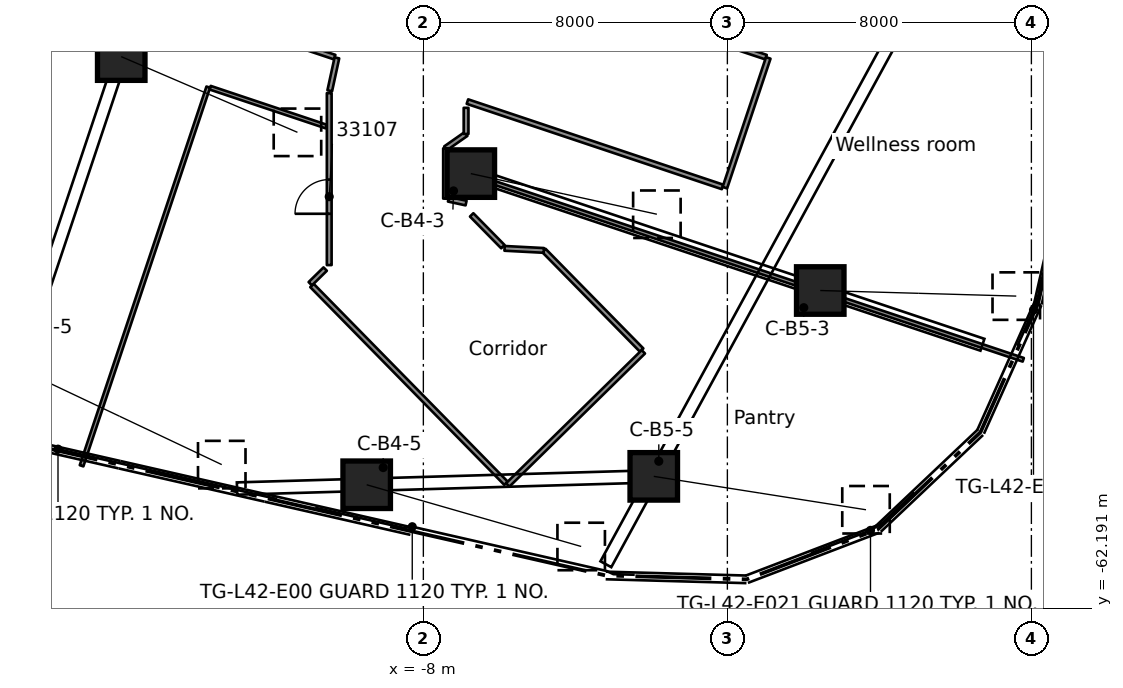
"""IFC4 building model, lengths in metres.
Left out: names, types, materials, properties, quantities, classifications, styles, units other than length and angle.
Written with IfcOpenShell. Run it as: python <this file> out.ifc"""

import sys

from ifc_helpers import new_model, si_unit, direction, frame, frame_2d, origin, origin_2d, place, context, subcontext, project, spatial, rectangle, extrude, element, fill, save


model = new_model("IFC4")
c1 = context("Model", 3, precision=1e-05, world=origin(), true_north=direction((0.0, 1.0)))
c2 = subcontext(c1, "Body", "Model", "MODEL_VIEW")
j1 = project(units=[si_unit("LENGTHUNIT", "METRE"), si_unit("PLANEANGLEUNIT", "RADIAN")], contexts=[c1])
p1 = place(None, origin())
s1 = spatial("IfcSite", under=j1, at=p1, CompositionType="ELEMENT")
p2 = place(p1, origin())
s2 = spatial("IfcBuilding", under=s1, at=p2, CompositionType="ELEMENT")
p3 = place(p2, frame((0.0, 0.0, 163.1)))
s3 = spatial("IfcBuildingStorey", under=s2, at=p3, CompositionType="ELEMENT", Elevation=163.1)
p4 = place(p3, frame((-15.95, -47.669, 0.541), z_axis=(0.795438712941, -0.34170402037, 0.500515350832), x_axis=(0.394701516002, 0.918809399857, 0.0)))
e1 = element("IfcColumn", 1, at=p4, inside=s3, PredefinedType="COLUMN", context=c2, shape_type="SweptSolid", body=[
    extrude(rectangle(XDim=1.25, YDim=1.25, at=origin_2d()), origin(), (0.0, 0.0, 1.0), 5.829),
])
p5 = place(p3, frame((-18.689, -55.856, 0.563), z_axis=(0.814063560894, -0.385271001, 0.434588051622), x_axis=(0.427779753308, 0.90388300275, 0.0)))
e2 = element("IfcColumn", 2, at=p5, inside=s3, PredefinedType="COLUMN", context=c2, shape_type="SweptSolid", body=[
    extrude(rectangle(XDim=1.25, YDim=1.25, at=origin_2d()), origin(), (0.0, 0.0, 1.0), 6.614),
])
p6 = place(p3, frame((-6.751, -50.747, 0.54), z_axis=(0.844129947707, -0.184282482849, 0.50347253937), x_axis=(0.213287138961, 0.976989557955, 0.0)))
e3 = element("IfcColumn", 3, at=p6, inside=s3, PredefinedType="COLUMN", context=c2, shape_type="SweptSolid", body=[
    extrude(rectangle(XDim=1.25, YDim=1.25, at=origin_2d()), origin(), (0.0, 0.0, 1.0), 5.8),
])
p7 = place(p3, frame((-9.491, -58.934, 0.561), z_axis=(0.862996024395, -0.248319472025, 0.439971932845), x_axis=(0.276521475753, 0.961007738495, 0.0)))
e4 = element("IfcColumn", 4, at=p7, inside=s3, PredefinedType="COLUMN", context=c2, shape_type="SweptSolid", body=[
    extrude(rectangle(XDim=1.25, YDim=1.25, at=origin_2d()), origin(), (0.0, 0.0, 1.0), 6.54),
])
p8 = place(p3, frame((2.444, -53.823, 0.544), z_axis=(0.87058335565, -0.024806701382, 0.491395205951), x_axis=(0.028482783098, 0.99959428323, 0.0)))
e5 = element("IfcColumn", 5, at=p8, inside=s3, PredefinedType="COLUMN", context=c2, shape_type="SweptSolid", body=[
    extrude(rectangle(XDim=1.25, YDim=1.25, at=origin_2d()), origin(), (0.0, 0.0, 1.0), 5.925),
])
p9 = place(p3, frame((-1.937, -58.713, 0.556), z_axis=(0.879775096656, -0.138488814612, 0.454770961618), x_axis=(0.15549910625, 0.98783603293, 0.0)))
e6 = element("IfcColumn", 6, at=p9, inside=s3, PredefinedType="COLUMN", context=c2, shape_type="SweptSolid", body=[
    extrude(rectangle(XDim=1.25, YDim=1.25, at=origin_2d()), origin(), (0.0, 0.0, 1.0), 6.348),
])
p10 = place(p3, frame((-10.932, -53.69, 0.0), z_axis=(0.0, 0.0, 1.0), x_axis=(0.700343889426, -0.713805601368, 0.0)))
e7 = element("IfcWall", 7, at=p10, inside=s3, PredefinedType="PARTITIONING", context=c2, shape_type="SweptSolid", body=[
    extrude(rectangle(XDim=7.291, YDim=0.125, at=frame_2d((3.645, 0.0))), origin(), (0.0, 0.0, 1.0), 3.56),
])
p11 = place(p3, frame((-6.729, -51.833, 0.0), z_axis=(0.0, 0.0, 1.0), x_axis=(0.701147009795, -0.713016739394, 0.0)))
e8 = element("IfcWall", 8, at=p11, inside=s3, PredefinedType="PARTITIONING", context=c2, shape_type="SweptSolid", body=[
    extrude(rectangle(XDim=1.172, YDim=0.125, at=frame_2d((0.586, 0.0))), origin(), (0.0, 0.0, 1.0), 3.56),
])
p12 = place(p3, frame((-4.83, -52.768, 0.0), z_axis=(0.0, 0.0, 1.0), x_axis=(0.700567944342, -0.713585702884, 0.0)))
e9 = element("IfcWall", 9, at=p12, inside=s3, PredefinedType="PARTITIONING", context=c2, shape_type="SweptSolid", body=[
    extrude(rectangle(XDim=3.676, YDim=0.125, at=frame_2d((1.838, 0.0))), origin(), (0.0, 0.0, 1.0), 3.56),
])
p13 = place(p3, frame((-13.612, -48.486, 0.0), z_axis=(0.0, 0.0, 1.0), x_axis=(0.948319156471, -0.317318101391, 0.0)))
e10 = element("IfcWall", 10, at=p13, inside=s3, PredefinedType="PARTITIONING", context=c2, shape_type="SweptSolid", body=[
    extrude(rectangle(XDim=3.224, YDim=0.1, at=frame_2d((1.612, 0.0))), origin(), (0.0, 0.0, 1.0), 3.56),
])
p14 = place(p3, frame((-7.338, -50.586, 0.0), z_axis=(0.0, 0.0, 1.0), x_axis=(0.948329073506, -0.317288462355, 0.0)))
e11 = element("IfcWall", 11, at=p14, inside=s3, PredefinedType="PARTITIONING", context=c2, shape_type="SweptSolid", body=[
    extrude(rectangle(XDim=15.948, YDim=0.1, at=frame_2d((7.974, 0.0))), origin(), (0.0, 0.0, 1.0), 3.56),
])
p15 = place(p3, frame((-10.334, -47.682, 0.0), z_axis=(0.0, 0.0, 1.0), x_axis=(-0.948331823852, 0.317280241852, 0.0)))
e12 = element("IfcWall", 12, at=p15, inside=s3, PredefinedType="PARTITIONING", context=c2, shape_type="SweptSolid", body=[
    extrude(rectangle(XDim=15.516, YDim=0.125, at=frame_2d((7.758, 0.0))), origin(), (0.0, 0.0, 1.0), 3.56),
])
p16 = place(p15, frame((7.288, 0.0, 0.0)))
e13 = element("IfcOpeningElement", 13, at=p16, cuts=e12, PredefinedType="OPENING", context=c2, shape_type="SweptSolid", body=[
    extrude(rectangle(XDim=0.9, YDim=2.1, at=frame_2d((0.45, 1.05))), frame((0.0, 0.073, 0.0), z_axis=(0.0, -1.0, 0.0), x_axis=(1.0, 0.0, 0.0)), (0.0, 0.0, 1.0), 0.145),
])
p17 = place(p3, frame((-6.84, -48.852, 0.0), z_axis=(0.0, 0.0, 1.0), x_axis=(0.948351729274, -0.317220739522, 0.0)))
e14 = element("IfcWall", 14, at=p17, inside=s3, PredefinedType="PARTITIONING", context=c2, shape_type="SweptSolid", body=[
    extrude(rectangle(XDim=7.08, YDim=0.125, at=frame_2d((3.54, 0.0))), origin(), (0.0, 0.0, 1.0), 3.56),
])
p18 = place(p3, frame((-6.008, -45.333, 0.0), z_axis=(0.0, 0.0, 1.0), x_axis=(0.948343292344, -0.31724596115, 0.0)))
e15 = element("IfcWall", 15, at=p18, inside=s3, PredefinedType="PARTITIONING", context=c2, shape_type="SweptSolid", body=[
    extrude(rectangle(XDim=7.408, YDim=0.125, at=frame_2d((3.704, 0.0))), origin(), (0.0, 0.0, 1.0), 3.56),
])
p19 = place(p18, frame((3.288, 0.0, 0.0)))
e16 = element("IfcOpeningElement", 16, at=p19, cuts=e15, PredefinedType="OPENING", context=c2, shape_type="SweptSolid", body=[
    extrude(rectangle(XDim=0.9, YDim=2.1, at=frame_2d((0.45, 1.05))), frame((0.0, 0.073, 0.0), z_axis=(0.0, -1.0, 0.0), x_axis=(1.0, 0.0, 0.0)), (0.0, 0.0, 1.0), 0.145),
])
p20 = place(p3, frame((-7.34, -51.421, 0.0), z_axis=(0.0, 0.0, 1.0), x_axis=(0.977097435109, -0.212792392496, 0.0)))
e17 = element("IfcWall", 17, at=p20, inside=s3, PredefinedType="PARTITIONING", context=c2, shape_type="SweptSolid", body=[
    extrude(rectangle(XDim=0.475, YDim=0.125, at=frame_2d((0.238, 0.0))), origin(), (0.0, 0.0, 1.0), 3.56),
])
p21 = place(p3, frame((-7.416, -50.082, 0.0), z_axis=(0.0, 0.0, 1.0), x_axis=(0.819301517876, 0.573362906723, 0.0)))
e18 = element("IfcWall", 18, at=p21, inside=s3, PredefinedType="PARTITIONING", context=c2, shape_type="SweptSolid", body=[
    extrude(rectangle(XDim=0.659, YDim=0.125, at=frame_2d((0.33, 0.0))), origin(), (0.0, 0.0, 1.0), 3.56),
])
p22 = place(p3, frame((-5.78, -58.939, 0.0), z_axis=(0.0, 0.0, 1.0), x_axis=(0.713690867746, 0.70046080925, 0.0)))
e19 = element("IfcWall", 19, at=p22, inside=s3, PredefinedType="PARTITIONING", context=c2, shape_type="SweptSolid", body=[
    extrude(rectangle(XDim=5.001, YDim=0.125, at=frame_2d((2.5, 0.0))), origin(), (0.0, 0.0, 1.0), 3.56),
])
p23 = place(p3, frame((-5.863, -52.714, 0.0), z_axis=(0.0, 0.0, 1.0), x_axis=(0.998638615088, -0.052162404617, 0.0)))
e20 = element("IfcWall", 20, at=p23, inside=s3, PredefinedType="PARTITIONING", context=c2, shape_type="SweptSolid", body=[
    extrude(rectangle(XDim=1.034, YDim=0.125, at=frame_2d((0.517, 0.0))), origin(), (0.0, 0.0, 1.0), 3.56),
])
p24 = place(p3, frame((-10.976, -53.645, 0.0), z_axis=(0.0, 0.0, 1.0), x_axis=(0.713503545627, 0.700651618408, 0.0)))
e21 = element("IfcWall", 21, at=p24, inside=s3, PredefinedType="PARTITIONING", context=c2, shape_type="SweptSolid", body=[
    extrude(rectangle(XDim=0.551, YDim=0.125, at=frame_2d((0.275, 0.0))), origin(), (0.0, 0.0, 1.0), 3.56),
])
p25 = place(p3, frame((-0.066, -51.117, 0.0), z_axis=(0.0, 0.0, 1.0), x_axis=(0.317183836314, 0.948364072485, 0.0)))
e22 = element("IfcWall", 22, at=p25, inside=s3, PredefinedType="PARTITIONING", context=c2, shape_type="SweptSolid", body=[
    extrude(rectangle(XDim=3.6, YDim=0.125, at=frame_2d((1.8, 0.0))), origin(), (0.0, 0.0, 1.0), 3.56),
])
p26 = place(p3, frame((-16.994, -58.435, 0.0), z_axis=(0.0, 0.0, 1.0), x_axis=(0.317308025423, 0.948322527942, 0.0)))
e23 = element("IfcWall", 23, at=p26, inside=s3, PredefinedType="PARTITIONING", context=c2, shape_type="SweptSolid", body=[
    extrude(rectangle(XDim=10.507, YDim=0.1, at=frame_2d((5.253, 0.0))), origin(), (0.0, 0.0, 1.0), 3.56),
])
p27 = place(p3, frame((-10.463, -48.567, 0.0), z_axis=(0.0, 0.0, 1.0), x_axis=(0.212372391341, 0.977188808469, 0.0)))
e24 = element("IfcWall", 24, at=p27, inside=s3, PredefinedType="PARTITIONING", context=c2, shape_type="SweptSolid", body=[
    extrude(rectangle(XDim=0.885, YDim=0.125, at=frame_2d((0.443, 0.0))), origin(), (0.0, 0.0, 1.0), 3.56),
])
p28 = place(p3, frame((-6.876, -49.704, 0.0), z_axis=(0.0, 0.0, 1.0), x_axis=(0.0, 1.0, 0.0)))
e25 = element("IfcWall", 25, at=p28, inside=s3, PredefinedType="PARTITIONING", context=c2, shape_type="SweptSolid", body=[
    extrude(rectangle(XDim=0.688, YDim=0.125, at=frame_2d((0.344, 0.0))), origin(), (0.0, 0.0, 1.0), 3.56),
])
p29 = place(p3, frame((-7.416, -51.404, 0.0), z_axis=(0.0, 0.0, 1.0), x_axis=(0.0, 1.0, 0.0)))
e26 = element("IfcWall", 26, at=p29, inside=s3, PredefinedType="PARTITIONING", context=c2, shape_type="SweptSolid", body=[
    extrude(rectangle(XDim=1.322, YDim=0.125, at=frame_2d((0.661, 0.0))), origin(), (0.0, 0.0, 1.0), 3.56),
])
p30 = place(p3, frame((-10.477, -53.154, 0.0), z_axis=(0.0, 0.0, 1.0), x_axis=(0.0, 1.0, 0.0)))
e27 = element("IfcWall", 27, at=p30, inside=s3, PredefinedType="PARTITIONING", context=c2, shape_type="SweptSolid", body=[
    extrude(rectangle(XDim=4.525, YDim=0.125, at=frame_2d((2.263, 0.0))), origin(), (0.0, 0.0, 1.0), 3.56),
])
p31 = place(p30, frame((1.35, 0.0, 0.0)))
e28 = element("IfcOpeningElement", 28, at=p31, cuts=e27, PredefinedType="OPENING", context=c2, shape_type="SweptSolid", body=[
    extrude(rectangle(XDim=0.9, YDim=2.1, at=frame_2d((0.45, 1.05))), frame((0.0, 0.073, 0.0), z_axis=(0.0, -1.0, 0.0), x_axis=(1.0, 0.0, 0.0)), (0.0, 0.0, 1.0), 0.145),
])
p32 = place(p31, origin())
e29 = element("IfcDoor", 29, at=p32, inside=s3, OperationType="SINGLE_SWING_LEFT", PredefinedType="DOOR", context=c2, shape_type="SweptSolid", body=[
    extrude(rectangle(XDim=0.9, YDim=2.1, at=frame_2d((0.45, 1.05))), frame((0.0, 0.025, 0.0), z_axis=(0.0, -1.0, 0.0), x_axis=(1.0, 0.0, 0.0)), (0.0, 0.0, 1.0), 0.05),
])
fill(e28, e29)
save(model, sys.argv[1])
